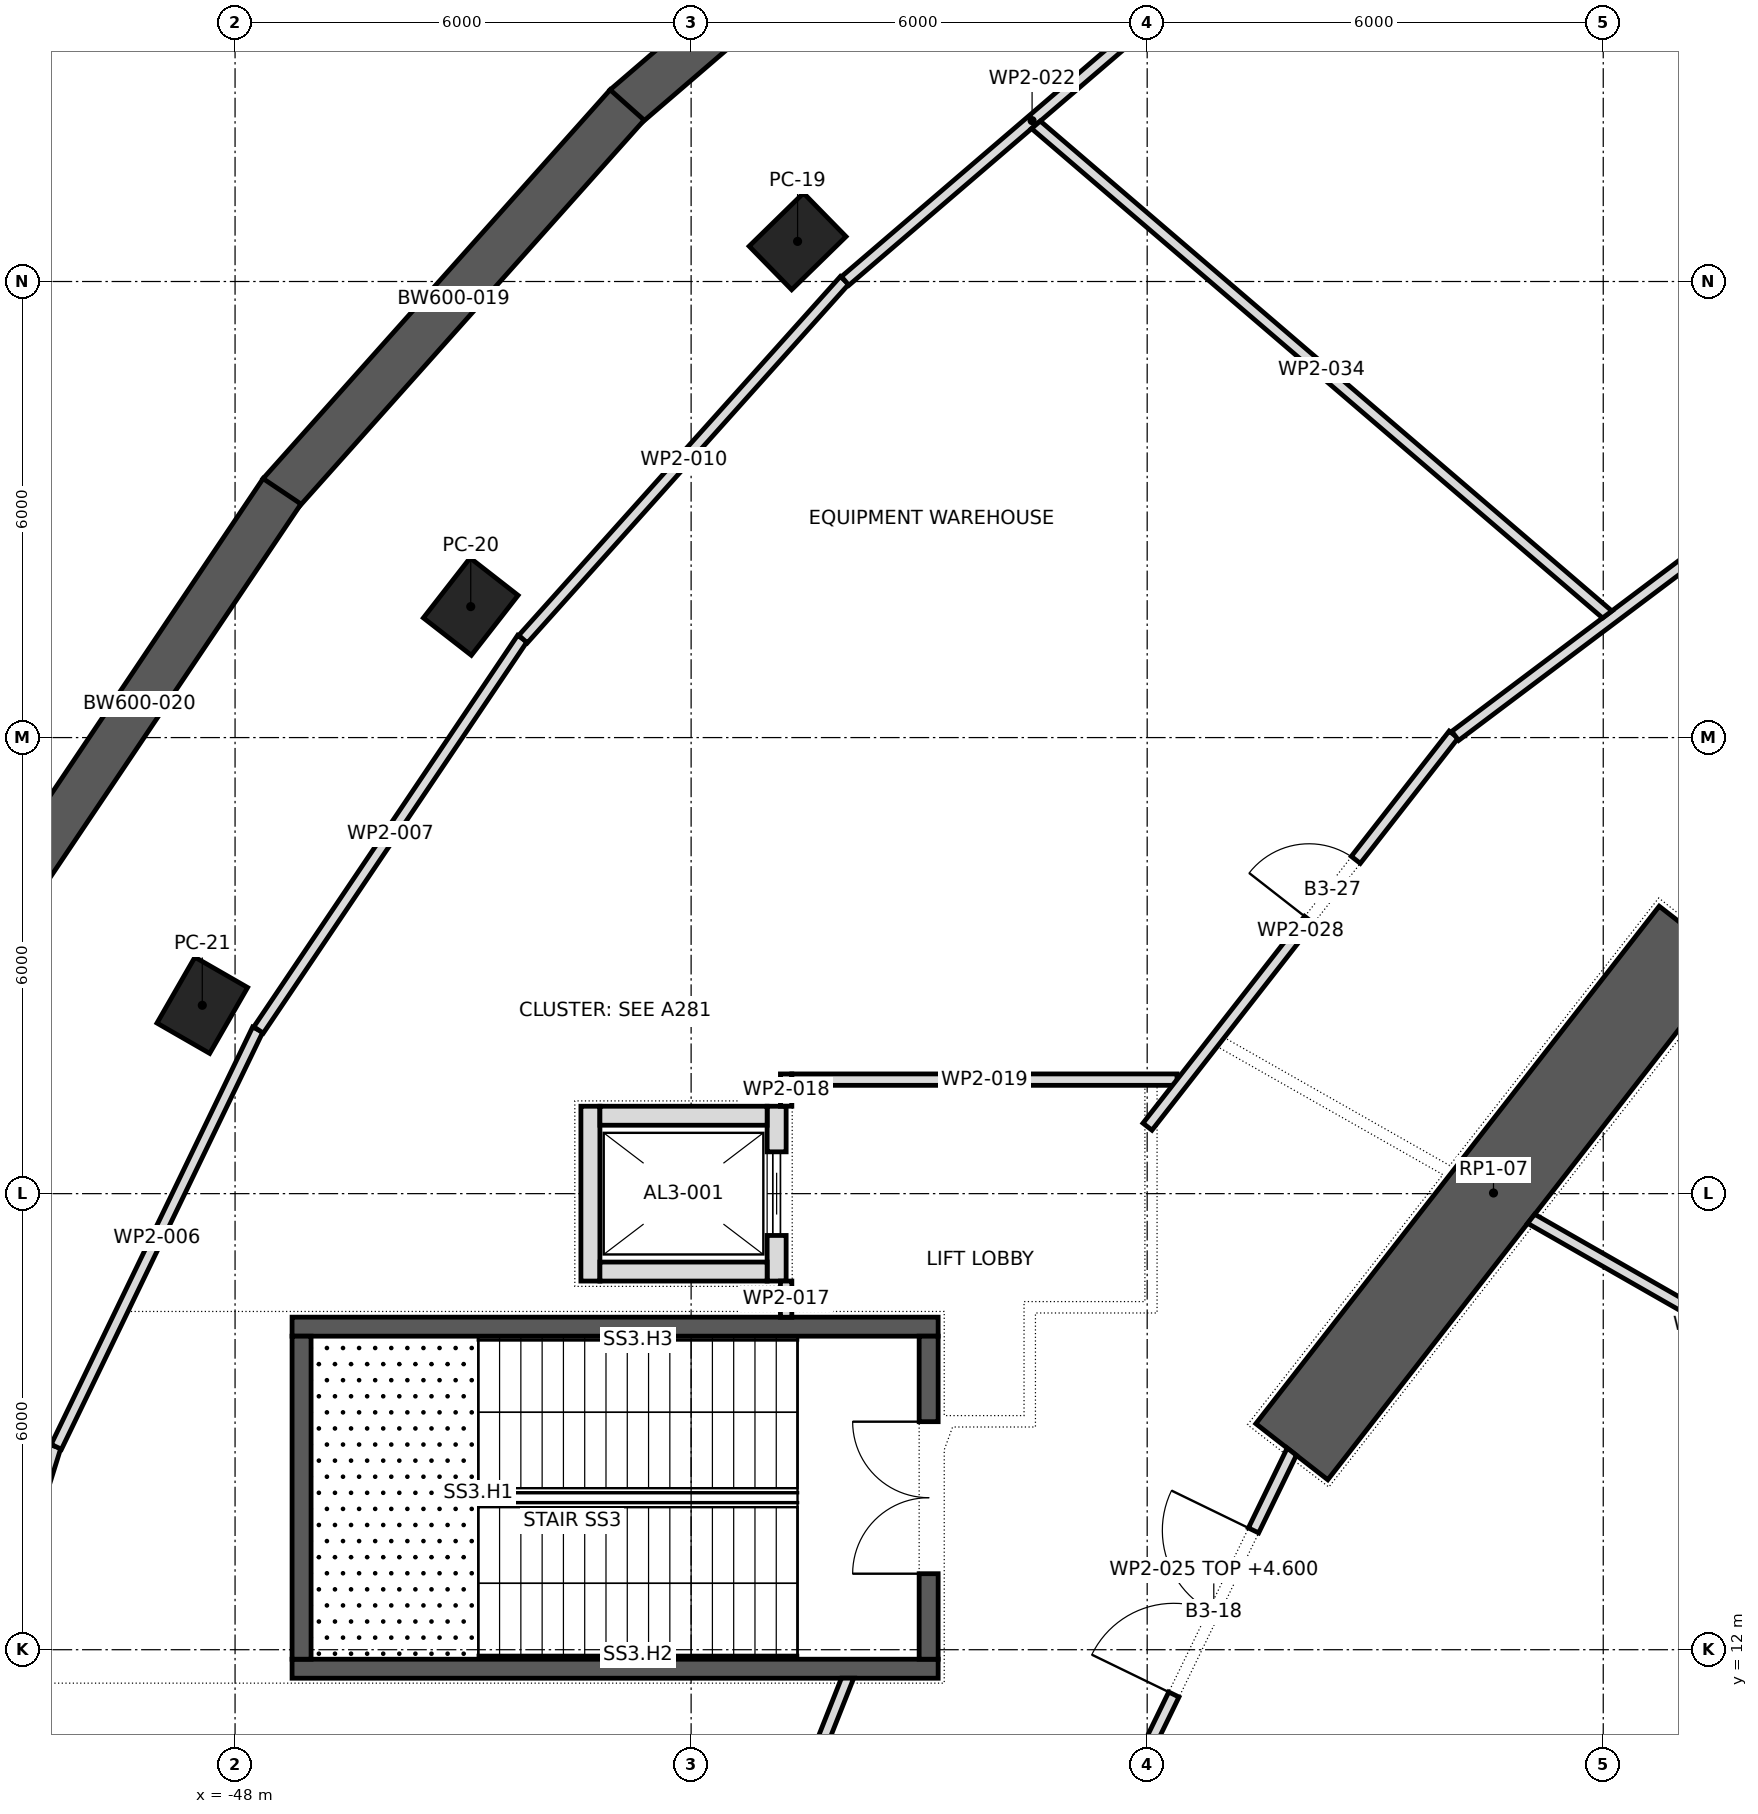
"""IFC4 building model, lengths in metres.
Left out: names, types, materials, properties, quantities, classifications, styles, units other than length and angle.
Written with IfcOpenShell. Run it as: python <this file> out.ifc"""

import sys

from ifc_helpers import new_model, si_unit, direction, frame, frame_2d, origin, origin_2d, place, context, subcontext, project, spatial, polyline, rectangle, outline, extrude, element, fill, save


model = new_model("IFC4")
c1 = context("Model", 3, precision=1e-05, world=origin(), true_north=direction((0.0, 1.0)))
c2 = subcontext(c1, "Body", "Model", "MODEL_VIEW")
j1 = project(units=[si_unit("LENGTHUNIT", "METRE"), si_unit("PLANEANGLEUNIT", "RADIAN")], contexts=[c1])
p1 = place(None, origin())
s1 = spatial("IfcSite", under=j1, at=p1, CompositionType="ELEMENT")
p2 = place(p1, origin())
s2 = spatial("IfcBuilding", under=s1, at=p2, CompositionType="ELEMENT")
p3 = place(p2, frame((0.0, 0.0, -15.0)))
s3 = spatial("IfcBuildingStorey", under=s2, at=p3, CompositionType="ELEMENT", Elevation=-15.0)
for number, where, z_axis, x_axis in (
    (1, (-40.599, 30.528, -0.4), (0.0, 0.0, 1.0), (-0.715, -0.699, 0.0)),
    (2, (-44.899, 25.723, -0.4), (0.0, 0.0, 1.0), (-0.615, -0.789, 0.0)),
    (3, (-48.431, 20.478, -0.4), (0.0, 0.0, 1.0), (-0.499, -0.867, 0.0)),
):
    element("IfcColumn", number, at=place(p3, frame(where, z_axis=z_axis, x_axis=x_axis)), inside=s3, PredefinedType="COLUMN", context=c2, shape_type="SweptSolid", body=[
        extrude(rectangle(XDim=1.0, YDim=0.8, at=origin_2d()), origin(), (0.0, 0.0, 1.0), 5.9),
    ])
p4 = place(p3, frame((-28.79, 21.412, -0.4), z_axis=(0.0, 0.0, 1.0), x_axis=(-0.614825322247, -0.788663314174, 0.0)))
e4 = element("IfcWall", 4, at=p4, inside=s3, PredefinedType="SHEAR", context=c2, shape_type="SweptSolid", body=[
    extrude(rectangle(XDim=8.632, YDim=1.2, at=frame_2d((4.316, 0.0))), origin(), (0.0, 0.0, 1.0), 5.9),
])
p5 = place(p3, frame((-37.568, 36.853, -0.4), z_axis=(0.0, 0.0, 1.0), x_axis=(-0.758319142722, -0.65188348482, 0.0)))
e5 = element("IfcWall", 5, at=p5, inside=s3, PredefinedType="SOLIDWALL", context=c2, shape_type="SweptSolid", body=[
    extrude(rectangle(XDim=6.991, YDim=0.6, at=frame_2d((3.496, 0.0))), origin(), (0.0, 0.0, 1.0), 5.9),
])
p6 = place(p3, frame((-42.842, 32.323, -0.4), z_axis=(0.0, 0.0, 1.0), x_axis=(-0.665894053378, -0.74604631872, 0.0)))
e6 = element("IfcWall", 6, at=p6, inside=s3, PredefinedType="SOLIDWALL", context=c2, shape_type="SweptSolid", body=[
    extrude(rectangle(XDim=6.856, YDim=0.6, at=frame_2d((3.428, 0.0))), origin(), (0.0, 0.0, 1.0), 5.9),
])
p7 = place(p3, frame((-47.382, 27.24, -0.4), z_axis=(0.0, 0.0, 1.0), x_axis=(-0.557518861869, -0.830164272093, 0.0)))
e7 = element("IfcWall", 7, at=p7, inside=s3, PredefinedType="SOLIDWALL", context=c2, shape_type="SweptSolid", body=[
    extrude(rectangle(XDim=6.729, YDim=0.6, at=frame_2d((3.364, 0.0))), origin(), (0.0, 0.0, 1.0), 5.9),
])
for number, where, z_axis, x_axis in (
    (8, (-47.25, 16.25, 0.0), (0.0, 0.0, 1.0), (1.0, 0.0, 0.0)),
    (9, (-47.25, 11.75, 0.0), (0.0, 0.0, 1.0), (1.0, 0.0, 0.0)),
):
    element("IfcWall", number, at=place(p3, frame(where, z_axis=z_axis, x_axis=x_axis)), inside=s3, PredefinedType="SHEAR", context=c2, shape_type="SweptSolid", body=[
        extrude(rectangle(XDim=8.5, YDim=0.25, at=frame_2d((4.25, 0.0))), origin(), (0.0, 0.0, 1.0), 5.15),
    ])
p8 = place(p3, frame((-47.125, 11.875, 0.0), z_axis=(0.0, 0.0, 1.0), x_axis=(0.0, 1.0, 0.0)))
e10 = element("IfcWall", 10, at=p8, inside=s3, PredefinedType="SHEAR", context=c2, shape_type="SweptSolid", body=[
    extrude(rectangle(XDim=4.25, YDim=0.25, at=frame_2d((2.125, 0.0))), origin(), (0.0, 0.0, 1.0), 5.15),
])
p9 = place(p3, frame((-38.875, 11.875, 0.0), z_axis=(0.0, 0.0, 1.0), x_axis=(0.0, 1.0, 0.0)))
e11 = element("IfcWall", 11, at=p9, inside=s3, PredefinedType="SHEAR", context=c2, shape_type="SweptSolid", body=[
    extrude(rectangle(XDim=4.25, YDim=0.25, at=frame_2d((2.125, 0.0))), origin(), (0.0, 0.0, 1.0), 5.15),
])
p10 = place(p9, frame((1.125, 0.0, 0.0)))
e12 = element("IfcOpeningElement", 12, at=p10, cuts=e11, PredefinedType="OPENING", context=c2, shape_type="SweptSolid", body=[
    extrude(rectangle(XDim=2.0, YDim=2.1, at=frame_2d((1.0, 1.05))), frame((0.0, 0.137, 0.0), z_axis=(0.0, -1.0, 0.0), x_axis=(1.0, 0.0, 0.0)), (0.0, 0.0, 1.0), 0.274),
])
p11 = place(p3, frame((-43.325, 16.85, 0.0), z_axis=(0.0, 0.0, 1.0), x_axis=(0.0, 1.0, 0.0)))
e13 = element("IfcWall", 13, at=p11, inside=s3, PredefinedType="PARTITIONING", context=c2, shape_type="SweptSolid", body=[
    extrude(rectangle(XDim=2.3, YDim=0.25, at=frame_2d((1.15, 0.0))), origin(), (0.0, 0.0, 1.0), 5.15),
])
p12 = place(p3, frame((-40.875, 16.85, 0.0), z_axis=(0.0, 0.0, 1.0), x_axis=(0.0, 1.0, 0.0)))
e14 = element("IfcWall", 14, at=p12, inside=s3, PredefinedType="PARTITIONING", context=c2, shape_type="SweptSolid", body=[
    extrude(rectangle(XDim=2.3, YDim=0.25, at=frame_2d((1.15, 0.0))), origin(), (0.0, 0.0, 1.0), 5.15),
])
p13 = place(p12, frame((0.6, 0.0, 0.0)))
e15 = element("IfcOpeningElement", 15, at=p13, cuts=e14, PredefinedType="OPENING", context=c2, shape_type="SweptSolid", body=[
    extrude(rectangle(XDim=1.1, YDim=2.1, at=frame_2d((0.55, 1.05))), frame((0.0, 0.137, 0.0), z_axis=(0.0, -1.0, 0.0), x_axis=(1.0, 0.0, 0.0)), (0.0, 0.0, 1.0), 0.274),
])
for number, where, z_axis, x_axis in (
    (16, (-43.2, 19.025, 0.0), (0.0, 0.0, 1.0), (1.0, 0.0, 0.0)),
    (17, (-43.2, 16.975, 0.0), (0.0, 0.0, 1.0), (1.0, 0.0, 0.0)),
):
    element("IfcWall", number, at=place(p3, frame(where, z_axis=z_axis, x_axis=x_axis)), inside=s3, PredefinedType="PARTITIONING", context=c2, shape_type="SweptSolid", body=[
        extrude(rectangle(XDim=2.2, YDim=0.25, at=frame_2d((1.1, 0.0))), origin(), (0.0, 0.0, 1.0), 5.15),
    ])
p14 = place(p3, frame((-52.154, 8.934, 0.0), z_axis=(0.0, 0.0, 1.0), x_axis=(0.297713123711, 0.954655380737, 0.0)))
e18 = element("IfcWall", 18, at=p14, inside=s3, PredefinedType="PARTITIONING", context=c2, shape_type="SweptSolid", body=[
    extrude(rectangle(XDim=6.013, YDim=0.15, at=frame_2d((3.006, 0.0))), origin(), (0.0, 0.0, 1.0), 5.15),
])
p15 = place(p3, frame((-50.352, 14.669, 0.0), z_axis=(0.0, 0.0, 1.0), x_axis=(0.434723306584, 0.900564071409, 0.0)))
e19 = element("IfcWall", 19, at=p15, inside=s3, PredefinedType="PARTITIONING", context=c2, shape_type="SweptSolid", body=[
    extrude(rectangle(XDim=6.096, YDim=0.15, at=frame_2d((3.048, 0.0))), origin(), (0.0, 0.0, 1.0), 5.15),
])
p16 = place(p3, frame((-47.691, 20.153, 0.0), z_axis=(0.0, 0.0, 1.0), x_axis=(0.558812320082, 0.829294152231, 0.0)))
e20 = element("IfcWall", 20, at=p16, inside=s3, PredefinedType="PARTITIONING", context=c2, shape_type="SweptSolid", body=[
    extrude(rectangle(XDim=6.21, YDim=0.15, at=frame_2d((3.105, 0.0))), origin(), (0.0, 0.0, 1.0), 5.15),
])
p17 = place(p3, frame((-44.211, 25.295, 0.0), z_axis=(0.0, 0.0, 1.0), x_axis=(0.6673947824, 0.744704105283, 0.0)))
e21 = element("IfcWall", 21, at=p17, inside=s3, PredefinedType="PARTITIONING", context=c2, shape_type="SweptSolid", body=[
    extrude(rectangle(XDim=6.338, YDim=0.15, at=frame_2d((3.169, 0.0))), origin(), (0.0, 0.0, 1.0), 5.15),
])
p18 = place(p3, frame((-41.699, 7.183, 0.0), z_axis=(0.0, 0.0, 1.0), x_axis=(0.367872650967, 0.929876181365, 0.0)))
e22 = element("IfcWall", 22, at=p18, inside=s3, PredefinedType="PARTITIONING", context=c2, shape_type="SweptSolid", body=[
    extrude(outline(polyline([(0.0, -0.075), (4.807, -0.075), (4.748, 0.075), (0.0, 0.075), (0.0, -0.075)])), origin(), (0.0, 0.0, 1.0), 5.15),
])
p19 = place(p3, frame((-40.75, 16.374, 0.0), z_axis=(0.0, 0.0, 1.0), x_axis=(0.0, 1.0, 0.0)))
e23 = element("IfcWall", 23, at=p19, inside=s3, PredefinedType="PARTITIONING", context=c2, shape_type="SweptSolid", body=[
    extrude(rectangle(XDim=0.476, YDim=0.15, at=frame_2d((0.238, 0.0))), origin(), (0.0, 0.0, 1.0), 5.15),
])
p20 = place(p3, frame((-40.75, 19.15, 0.0), z_axis=(0.0, 0.0, 1.0), x_axis=(0.0, 1.0, 0.0)))
e24 = element("IfcWall", 24, at=p20, inside=s3, PredefinedType="PARTITIONING", context=c2, shape_type="SweptSolid", body=[
    extrude(rectangle(XDim=0.425, YDim=0.15, at=frame_2d((0.212, 0.0))), origin(), (0.0, 0.0, 1.0), 5.15),
])
p21 = place(p3, frame((-40.675, 19.5, 0.0), z_axis=(0.0, 0.0, 1.0), x_axis=(1.0, 0.0, 0.0)))
e25 = element("IfcWall", 25, at=p21, inside=s3, PredefinedType="PARTITIONING", context=c2, shape_type="SweptSolid", body=[
    extrude(rectangle(XDim=5.068, YDim=0.15, at=frame_2d((2.534, 0.0))), origin(), (0.0, 0.0, 1.0), 5.15),
])
p22 = place(p3, frame((-39.973, 30.007, 0.0), z_axis=(0.0, 0.0, 1.0), x_axis=(0.759038455419, 0.651045791934, 0.0)))
e26 = element("IfcWall", 26, at=p22, inside=s3, PredefinedType="PARTITIONING", context=c2, shape_type="SweptSolid", body=[
    extrude(rectangle(XDim=6.479, YDim=0.15, at=frame_2d((3.24, 0.0))), origin(), (0.0, 0.0, 1.0), 5.15),
])
p23 = place(p3, frame((-36.15, 10.38, 0.0), z_axis=(0.0, 0.0, 1.0), x_axis=(0.436936398764, 0.899492403212, 0.0)))
e27 = element("IfcWall", 27, at=p23, inside=s3, PredefinedType="PARTITIONING", context=c2, shape_type="SweptSolid", body=[
    extrude(outline(polyline([(0.017, -0.075), (4.682, -0.075), (4.714, 0.075), (-0.017, 0.075), (0.017, -0.075)])), origin(), (0.0, 0.0, 1.0), 4.6),
])
p24 = place(p23, frame((1.146, 0.0, 0.0)))
e28 = element("IfcOpeningElement", 28, at=p24, cuts=e27, PredefinedType="OPENING", context=c2, shape_type="SweptSolid", body=[
    extrude(rectangle(XDim=2.4, YDim=2.1, at=frame_2d((1.2, 1.05))), frame((0.0, 0.087, 0.0), z_axis=(0.0, -1.0, 0.0), x_axis=(1.0, 0.0, 0.0)), (0.0, 0.0, 1.0), 0.174),
])
p25 = place(p3, frame((-35.996, 18.881, 0.0), z_axis=(0.0, 0.0, 1.0), x_axis=(0.615457986142, 0.788169694478, 0.0)))
e29 = element("IfcWall", 29, at=p25, inside=s3, PredefinedType="PARTITIONING", context=c2, shape_type="SweptSolid", body=[
    extrude(rectangle(XDim=6.545, YDim=0.15, at=frame_2d((3.272, 0.0))), origin(), (0.0, 0.0, 1.0), 5.15),
])
p26 = place(p25, frame((3.454, 0.0, 0.0)))
e30 = element("IfcOpeningElement", 30, at=p26, cuts=e29, PredefinedType="OPENING", context=c2, shape_type="SweptSolid", body=[
    extrude(rectangle(XDim=1.0, YDim=2.1, at=frame_2d((0.5, 1.05))), frame((0.0, 0.087, 0.0), z_axis=(0.0, -1.0, 0.0), x_axis=(1.0, 0.0, 0.0)), (0.0, 0.0, 1.0), 0.174),
])
p27 = place(p3, frame((-31.947, 24.022, 0.0), z_axis=(0.0, 0.0, 1.0), x_axis=(0.799194171191, 0.601072937949, 0.0)))
e31 = element("IfcWall", 31, at=p27, inside=s3, PredefinedType="PARTITIONING", context=c2, shape_type="SweptSolid", body=[
    extrude(rectangle(XDim=10.444, YDim=0.15, at=frame_2d((5.222, 0.0))), origin(), (0.0, 0.0, 1.0), 5.15),
])
p28 = place(p3, frame((-29.947, 25.619, 0.0), z_axis=(0.0, 0.0, 1.0), x_axis=(-0.759265306208, 0.650781218836, 0.0)))
e32 = element("IfcWall", 32, at=p28, inside=s3, PredefinedType="PARTITIONING", context=c2, shape_type="SweptSolid", body=[
    extrude(outline(polyline([(-0.017, -0.075), (9.888, -0.075), (9.911, 0.075), (0.017, 0.075), (-0.017, -0.075)])), origin(), (0.0, 0.0, 1.0), 5.15),
])
p29 = place(p3, frame((-26.074, 14.882, 0.0), z_axis=(0.0, 0.0, 1.0), x_axis=(-0.868133416031, 0.496330909746, 0.0)))
e33 = element("IfcWall", 33, at=p29, inside=s3, PredefinedType="PARTITIONING", context=c2, shape_type="SweptSolid", body=[
    extrude(outline(polyline([(0.0, -0.075), (5.604, -0.075), (5.626, 0.075), (0.0, 0.075), (0.0, -0.075)])), origin(), (0.0, 0.0, 1.0), 5.15),
])
p30 = place(p13, origin())
e34 = element("IfcDoor", 34, at=p30, inside=s3, OperationType="SLIDING_TO_LEFT", PredefinedType="DOOR", context=c2, shape_type="SweptSolid", body=[
    extrude(rectangle(XDim=1.1, YDim=2.1, at=frame_2d((0.55, 1.05))), frame((0.0, 0.025, 0.0), z_axis=(0.0, -1.0, 0.0), x_axis=(1.0, 0.0, 0.0)), (0.0, 0.0, 1.0), 0.05),
])
fill(e15, e34)
p31 = place(p10, origin())
e35 = element("IfcDoor", 35, at=p31, inside=s3, OperationType="DOUBLE_DOOR_SINGLE_SWING", PredefinedType="DOOR", context=c2, shape_type="SweptSolid", body=[
    extrude(rectangle(XDim=2.0, YDim=2.1, at=frame_2d((1.0, 1.05))), frame((0.0, 0.025, 0.0), z_axis=(0.0, -1.0, 0.0), x_axis=(1.0, 0.0, 0.0)), (0.0, 0.0, 1.0), 0.05),
])
fill(e12, e35)
p32 = place(p24, origin())
e36 = element("IfcDoor", 36, at=p32, inside=s3, OperationType="DOUBLE_DOOR_SINGLE_SWING", PredefinedType="DOOR", context=c2, shape_type="SweptSolid", body=[
    extrude(rectangle(XDim=2.4, YDim=2.1, at=frame_2d((1.2, 1.05))), frame((0.0, 0.025, 0.0), z_axis=(0.0, -1.0, 0.0), x_axis=(1.0, 0.0, 0.0)), (0.0, 0.0, 1.0), 0.05),
])
fill(e28, e36)
p33 = place(p26, origin())
e37 = element("IfcDoor", 37, at=p33, inside=s3, OperationType="SINGLE_SWING_RIGHT", PredefinedType="DOOR", context=c2, shape_type="SweptSolid", body=[
    extrude(rectangle(XDim=1.0, YDim=2.1, at=frame_2d((0.5, 1.05))), frame((0.0, 0.025, 0.0), z_axis=(0.0, -1.0, 0.0), x_axis=(1.0, 0.0, 0.0)), (0.0, 0.0, 1.0), 0.05),
])
fill(e30, e37)
save(model, sys.argv[1])
